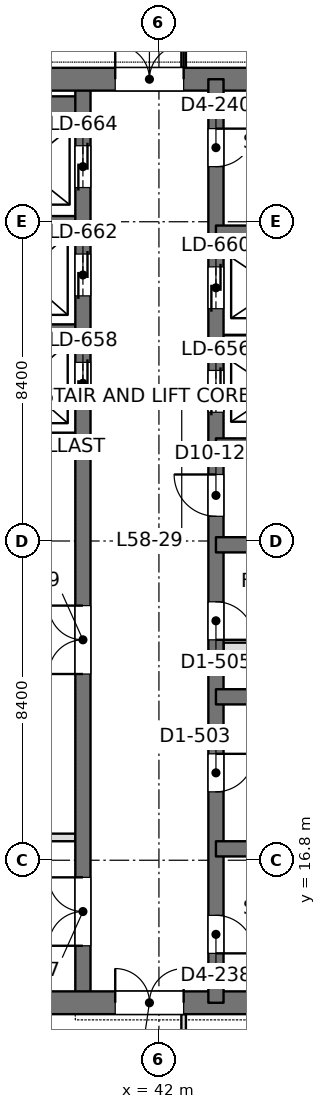
"""IFC4 building model, lengths in metres.
Left out: names, types, materials, properties, quantities, classifications, styles, units other than length and angle.
Written with IfcOpenShell. Run it as: python <this file> out.ifc"""

import sys

from ifc_helpers import new_model, si_unit, direction, frame, frame_2d, origin, place, context, subcontext, project, spatial, rectangle, extrude, element, fill, save


model = new_model("IFC4")
c1 = context("Model", 3, precision=1e-05, world=origin(), true_north=direction((0.0, 1.0)))
c2 = subcontext(c1, "Body", "Model", "MODEL_VIEW")
j1 = project(units=[si_unit("LENGTHUNIT", "METRE"), si_unit("PLANEANGLEUNIT", "RADIAN")], contexts=[c1])
p1 = place(None, origin())
s1 = spatial("IfcSite", under=j1, at=p1, CompositionType="ELEMENT")
p2 = place(p1, origin())
s2 = spatial("IfcBuilding", under=s1, at=p2, CompositionType="ELEMENT")
p3 = place(p2, frame((0.0, 0.0, 254.7)))
s3 = spatial("IfcBuildingStorey", under=s2, at=p3, CompositionType="ELEMENT", Elevation=254.7)
p4 = place(p3, frame((33.75, 13.05, 0.0), z_axis=(0.0, 0.0, 1.0), x_axis=(1.0, 0.0, 0.0)))
e1 = element("IfcWall", 1, at=p4, inside=s3, PredefinedType="SHEAR", context=c2, shape_type="SweptSolid", body=[
    extrude(rectangle(XDim=17.7, YDim=0.6, at=frame_2d((8.85, 0.0))), origin(), (0.0, 0.0, 1.0), 4.5),
])
p5 = place(p4, frame((7.1, 0.0, 0.0)))
e2 = element("IfcOpeningElement", 2, at=p5, cuts=e1, PredefinedType="OPENING", context=c2, shape_type="SweptSolid", body=[
    extrude(rectangle(XDim=1.8, YDim=2.4, at=frame_2d((0.9, 1.2))), frame((0.0, 0.31, 0.0), z_axis=(0.0, -1.0, 0.0), x_axis=(1.0, 0.0, 0.0)), (0.0, 0.0, 1.0), 0.62),
])
p6 = place(p3, frame((33.75, 37.35, 0.0), z_axis=(0.0, 0.0, 1.0), x_axis=(1.0, 0.0, 0.0)))
e3 = element("IfcWall", 3, at=p6, inside=s3, PredefinedType="SHEAR", context=c2, shape_type="SweptSolid", body=[
    extrude(rectangle(XDim=17.7, YDim=0.6, at=frame_2d((8.85, 0.0))), origin(), (0.0, 0.0, 1.0), 4.5),
])
p7 = place(p6, frame((7.1, 0.0, 0.0)))
e4 = element("IfcOpeningElement", 4, at=p7, cuts=e3, PredefinedType="OPENING", context=c2, shape_type="SweptSolid", body=[
    extrude(rectangle(XDim=1.8, YDim=2.4, at=frame_2d((0.9, 1.2))), frame((0.0, 0.31, 0.0), z_axis=(0.0, -1.0, 0.0), x_axis=(1.0, 0.0, 0.0)), (0.0, 0.0, 1.0), 0.62),
])
p8 = place(p3, frame((43.5, 13.05, 0.0), z_axis=(0.0, 0.0, 1.0), x_axis=(0.0, 1.0, 0.0)))
e5 = element("IfcWall", 5, at=p8, inside=s3, PredefinedType="SHEAR", context=c2, shape_type="SweptSolid", body=[
    extrude(rectangle(XDim=24.3, YDim=0.4, at=frame_2d((12.15, 0.0))), origin(), (0.0, 0.0, 1.0), 4.5),
])
p9 = place(p8, frame((1.3, 0.0, 0.0)))
e6 = element("IfcOpeningElement", 6, at=p9, cuts=e5, PredefinedType="OPENING", context=c2, shape_type="SweptSolid", body=[
    extrude(rectangle(XDim=1.0, YDim=2.2, at=frame_2d((0.5, 1.1))), frame((0.0, 0.21, 0.0), z_axis=(0.0, -1.0, 0.0), x_axis=(1.0, 0.0, 0.0)), (0.0, 0.0, 1.0), 0.42),
])
p10 = place(p8, frame((22.0, 0.0, 0.0)))
e7 = element("IfcOpeningElement", 7, at=p10, cuts=e5, PredefinedType="OPENING", context=c2, shape_type="SweptSolid", body=[
    extrude(rectangle(XDim=1.0, YDim=2.2, at=frame_2d((0.5, 1.1))), frame((0.0, 0.21, 0.0), z_axis=(0.0, -1.0, 0.0), x_axis=(1.0, 0.0, 0.0)), (0.0, 0.0, 1.0), 0.42),
])
p11 = place(p8, frame((5.55, 0.0, 0.0)))
e8 = element("IfcOpeningElement", 8, at=p11, cuts=e5, PredefinedType="OPENING", context=c2, shape_type="SweptSolid", body=[
    extrude(rectangle(XDim=1.0, YDim=2.2, at=frame_2d((0.5, 1.1))), frame((0.0, 0.21, 0.0), z_axis=(0.0, -1.0, 0.0), x_axis=(1.0, 0.0, 0.0)), (0.0, 0.0, 1.0), 0.42),
])
p12 = place(p8, frame((9.55, 0.0, 0.0)))
e9 = element("IfcOpeningElement", 9, at=p12, cuts=e5, PredefinedType="OPENING", context=c2, shape_type="SweptSolid", body=[
    extrude(rectangle(XDim=1.0, YDim=2.2, at=frame_2d((0.5, 1.1))), frame((0.0, 0.21, 0.0), z_axis=(0.0, -1.0, 0.0), x_axis=(1.0, 0.0, 0.0)), (0.0, 0.0, 1.0), 0.42),
])
p13 = place(p8, frame((12.8, 0.0, 0.0)))
e10 = element("IfcOpeningElement", 10, at=p13, cuts=e5, PredefinedType="OPENING", context=c2, shape_type="SweptSolid", body=[
    extrude(rectangle(XDim=1.1, YDim=2.2, at=frame_2d((0.55, 1.1))), frame((0.0, 0.21, 0.0), z_axis=(0.0, -1.0, 0.0), x_axis=(1.0, 0.0, 0.0)), (0.0, 0.0, 1.0), 0.42),
])
p14 = place(p8, frame((15.538, 0.0, 0.0)))
e11 = element("IfcOpeningElement", 11, at=p14, cuts=e5, PredefinedType="OPENING", context=c2, shape_type="SweptSolid", body=[
    extrude(rectangle(XDim=1.1, YDim=2.2, at=frame_2d((0.55, 1.1))), frame((0.0, 0.21, 0.0), z_axis=(0.0, -1.0, 0.0), x_axis=(1.0, 0.0, 0.0)), (0.0, 0.0, 1.0), 0.42),
])
p15 = place(p8, frame((18.262, 0.0, 0.0)))
e12 = element("IfcOpeningElement", 12, at=p15, cuts=e5, PredefinedType="OPENING", context=c2, shape_type="SweptSolid", body=[
    extrude(rectangle(XDim=1.1, YDim=2.2, at=frame_2d((0.55, 1.1))), frame((0.0, 0.21, 0.0), z_axis=(0.0, -1.0, 0.0), x_axis=(1.0, 0.0, 0.0)), (0.0, 0.0, 1.0), 0.42),
])
p16 = place(p3, frame((40.0, 13.05, 0.0), z_axis=(0.0, 0.0, 1.0), x_axis=(0.0, 1.0, 0.0)))
e13 = element("IfcWall", 13, at=p16, inside=s3, PredefinedType="SHEAR", context=c2, shape_type="SweptSolid", body=[
    extrude(rectangle(XDim=24.3, YDim=0.4, at=frame_2d((12.15, 0.0))), origin(), (0.0, 0.0, 1.0), 4.5),
])
p17 = place(p16, frame((15.75, 0.0, 0.0)))
e14 = element("IfcOpeningElement", 14, at=p17, cuts=e13, PredefinedType="OPENING", context=c2, shape_type="SweptSolid", body=[
    extrude(rectangle(XDim=1.1, YDim=2.2, at=frame_2d((0.55, 1.1))), frame((0.0, 0.21, 0.0), z_axis=(0.0, -1.0, 0.0), x_axis=(1.0, 0.0, 0.0)), (0.0, 0.0, 1.0), 0.42),
])
p18 = place(p16, frame((18.6, 0.0, 0.0)))
e15 = element("IfcOpeningElement", 15, at=p18, cuts=e13, PredefinedType="OPENING", context=c2, shape_type="SweptSolid", body=[
    extrude(rectangle(XDim=1.1, YDim=2.2, at=frame_2d((0.55, 1.1))), frame((0.0, 0.21, 0.0), z_axis=(0.0, -1.0, 0.0), x_axis=(1.0, 0.0, 0.0)), (0.0, 0.0, 1.0), 0.42),
])
p19 = place(p16, frame((21.45, 0.0, 0.0)))
e16 = element("IfcOpeningElement", 16, at=p19, cuts=e13, PredefinedType="OPENING", context=c2, shape_type="SweptSolid", body=[
    extrude(rectangle(XDim=1.1, YDim=2.2, at=frame_2d((0.55, 1.1))), frame((0.0, 0.21, 0.0), z_axis=(0.0, -1.0, 0.0), x_axis=(1.0, 0.0, 0.0)), (0.0, 0.0, 1.0), 0.42),
])
p20 = place(p16, frame((8.65, 0.0, 0.0)))
e17 = element("IfcOpeningElement", 17, at=p20, cuts=e13, PredefinedType="OPENING", context=c2, shape_type="SweptSolid", body=[
    extrude(rectangle(XDim=1.8, YDim=2.4, at=frame_2d((0.9, 1.2))), frame((0.0, 0.21, 0.0), z_axis=(0.0, -1.0, 0.0), x_axis=(1.0, 0.0, 0.0)), (0.0, 0.0, 1.0), 0.42),
])
p21 = place(p16, frame((1.5, 0.0, 0.0)))
e18 = element("IfcOpeningElement", 18, at=p21, cuts=e13, PredefinedType="OPENING", context=c2, shape_type="SweptSolid", body=[
    extrude(rectangle(XDim=1.8, YDim=2.4, at=frame_2d((0.9, 1.2))), frame((0.0, 0.21, 0.0), z_axis=(0.0, -1.0, 0.0), x_axis=(1.0, 0.0, 0.0)), (0.0, 0.0, 1.0), 0.42),
])
for number, where, z_axis, x_axis in (
    (19, (51.15, 17.1, 0.0), (0.0, 0.0, 1.0), (-1.0, 0.0, 0.0)),
    (20, (51.15, 21.1, 0.0), (0.0, 0.0, 1.0), (-1.0, 0.0, 0.0)),
    (21, (51.15, 25.1, 0.0), (0.0, 0.0, 1.0), (-1.0, 0.0, 0.0)),
    (22, (51.15, 27.7, 0.0), (0.0, 0.0, 1.0), (-1.0, 0.0, 0.0)),
    (23, (51.15, 33.3, 0.0), (0.0, 0.0, 1.0), (-1.0, 0.0, 0.0)),
):
    element("IfcWall", number, at=place(p3, frame(where, z_axis=z_axis, x_axis=x_axis)), inside=s3, PredefinedType="SHEAR", context=c2, shape_type="SweptSolid", body=[
        extrude(rectangle(XDim=7.65, YDim=0.4, at=frame_2d((3.825, 0.0))), origin(), (0.0, 0.0, 1.0), 4.5),
    ])
p22 = place(p3, frame((46.7, 30.5, 0.0), z_axis=(0.0, 0.0, 1.0), x_axis=(-1.0, 0.0, 0.0)))
e24 = element("IfcWall", 24, at=p22, inside=s3, PredefinedType="SHEAR", context=c2, shape_type="SweptSolid", body=[
    extrude(rectangle(XDim=3.2, YDim=0.25, at=frame_2d((1.6, 0.0))), origin(), (0.0, 0.0, 1.0), 4.5),
])
p23 = place(p3, frame((40.0, 27.925, 0.0), z_axis=(0.0, 0.0, 1.0), x_axis=(-1.0, 0.0, 0.0)))
e25 = element("IfcWall", 25, at=p23, inside=s3, PredefinedType="SHEAR", context=c2, shape_type="SweptSolid", body=[
    extrude(rectangle(XDim=5.95, YDim=0.25, at=frame_2d((2.975, 0.0))), origin(), (0.0, 0.0, 1.0), 4.5),
])
for number, where, z_axis, x_axis in (
    (26, (40.0, 30.775, 0.0), (0.0, 0.0, 1.0), (-1.0, 0.0, 0.0)),
    (27, (40.0, 33.625, 0.0), (0.0, 0.0, 1.0), (-1.0, 0.0, 0.0)),
):
    element("IfcWall", number, at=place(p3, frame(where, z_axis=z_axis, x_axis=x_axis)), inside=s3, PredefinedType="SHEAR", context=c2, shape_type="SweptSolid", body=[
        extrude(rectangle(XDim=3.2, YDim=0.25, at=frame_2d((1.6, 0.0))), origin(), (0.0, 0.0, 1.0), 4.5),
    ])
p24 = place(p3, frame((40.0, 36.625, 0.0), z_axis=(0.0, 0.0, 1.0), x_axis=(-1.0, 0.0, 0.0)))
e28 = element("IfcWall", 28, at=p24, inside=s3, PredefinedType="SHEAR", context=c2, shape_type="SweptSolid", body=[
    extrude(rectangle(XDim=3.2, YDim=0.55, at=frame_2d((1.6, 0.0))), origin(), (0.0, 0.0, 1.0), 4.5),
])
p25 = place(p3, frame((33.898, 17.4, 0.0), z_axis=(0.0, 0.0, 1.0), x_axis=(1.0, 0.0, 0.0)))
e29 = element("IfcWall", 29, at=p25, inside=s3, PredefinedType="PARTITIONING", context=c2, shape_type="SweptSolid", body=[
    extrude(rectangle(XDim=5.904, YDim=0.2, at=frame_2d((2.952, 0.0))), origin(), (0.0, 0.0, 1.0), 3.8),
])
p26 = place(p3, frame((42.65, 10.798, 0.0), z_axis=(0.0, 0.0, 1.0), x_axis=(0.0, 1.0, 0.0)))
e30 = element("IfcWall", 30, at=p26, inside=s3, PredefinedType="PARTITIONING", context=c2, shape_type="SweptSolid", body=[
    extrude(rectangle(XDim=1.954, YDim=0.12, at=frame_2d((0.977, 0.0))), origin(), (0.0, 0.0, 1.0), 4.35),
])
p27 = place(p26, frame((0.302, 0.0, 0.0)))
e31 = element("IfcOpeningElement", 31, at=p27, cuts=e30, PredefinedType="OPENING", context=c2, shape_type="SweptSolid", body=[
    extrude(rectangle(XDim=1.1, YDim=2.4, at=frame_2d((0.55, 1.2))), frame((0.0, 0.07, 0.0), z_axis=(0.0, -1.0, 0.0), x_axis=(1.0, 0.0, 0.0)), (0.0, 0.0, 1.0), 0.14),
])
p28 = place(p3, frame((42.65, 37.648, 0.0), z_axis=(0.0, 0.0, 1.0), x_axis=(0.0, 1.0, 0.0)))
e32 = element("IfcWall", 32, at=p28, inside=s3, PredefinedType="PARTITIONING", context=c2, shape_type="SweptSolid", body=[
    extrude(rectangle(XDim=1.954, YDim=0.12, at=frame_2d((0.977, 0.0))), origin(), (0.0, 0.0, 1.0), 4.35),
])
p29 = place(p28, frame((0.552, 0.0, 0.0)))
e33 = element("IfcOpeningElement", 33, at=p29, cuts=e32, PredefinedType="OPENING", context=c2, shape_type="SweptSolid", body=[
    extrude(rectangle(XDim=1.1, YDim=2.4, at=frame_2d((0.55, 1.2))), frame((0.0, 0.07, 0.0), z_axis=(0.0, -1.0, 0.0), x_axis=(1.0, 0.0, 0.0)), (0.0, 0.0, 1.0), 0.14),
])
p30 = place(p3, frame((43.7, 22.4, 0.0), z_axis=(0.0, 0.0, 1.0), x_axis=(1.0, 0.0, 0.0)))
e34 = element("IfcWall", 34, at=p30, inside=s3, PredefinedType="PARTITIONING", context=c2, shape_type="SweptSolid", body=[
    extrude(rectangle(XDim=6.75, YDim=0.25, at=frame_2d((3.375, 0.0))), origin(), (0.0, 0.0, 1.0), 4.3),
])
p31 = place(p30, frame((2.9, 0.0, 0.0)))
e35 = element("IfcOpeningElement", 35, at=p31, cuts=e34, PredefinedType="OPENING", context=c2, shape_type="SweptSolid", body=[
    extrude(rectangle(XDim=0.9, YDim=2.2, at=frame_2d((0.45, 1.1))), frame((0.0, 0.135, 0.0), z_axis=(0.0, -1.0, 0.0), x_axis=(1.0, 0.0, 0.0)), (0.0, 0.0, 1.0), 0.27),
])
p32 = place(p5, origin())
e36 = element("IfcDoor", 36, at=p32, inside=s3, OperationType="DOUBLE_DOOR_SINGLE_SWING", PredefinedType="DOOR", context=c2, shape_type="SweptSolid", body=[
    extrude(rectangle(XDim=1.8, YDim=2.4, at=frame_2d((0.9, 1.2))), frame((0.0, 0.025, 0.0), z_axis=(0.0, -1.0, 0.0), x_axis=(1.0, 0.0, 0.0)), (0.0, 0.0, 1.0), 0.05),
])
fill(e2, e36)
p33 = place(p7, origin())
e37 = element("IfcDoor", 37, at=p33, inside=s3, OperationType="DOUBLE_DOOR_SINGLE_SWING", PredefinedType="DOOR", context=c2, shape_type="SweptSolid", body=[
    extrude(rectangle(XDim=1.8, YDim=2.4, at=frame_2d((0.9, 1.2))), frame((0.0, 0.025, 0.0), z_axis=(0.0, -1.0, 0.0), x_axis=(1.0, 0.0, 0.0)), (0.0, 0.0, 1.0), 0.05),
])
fill(e4, e37)
p34 = place(p9, frame((1.0, 0.0, 0.0), z_axis=(0.0, 0.0, 1.0), x_axis=(-1.0, 0.0, 0.0)))
e38 = element("IfcDoor", 38, at=p34, inside=s3, OperationType="SINGLE_SWING_RIGHT", PredefinedType="DOOR", context=c2, shape_type="SweptSolid", body=[
    extrude(rectangle(XDim=1.0, YDim=2.2, at=frame_2d((0.5, 1.1))), frame((0.0, 0.025, 0.0), z_axis=(0.0, -1.0, 0.0), x_axis=(1.0, 0.0, 0.0)), (0.0, 0.0, 1.0), 0.05),
])
fill(e6, e38)
p35 = place(p10, frame((1.0, 0.0, 0.0), z_axis=(0.0, 0.0, 1.0), x_axis=(-1.0, 0.0, 0.0)))
e39 = element("IfcDoor", 39, at=p35, inside=s3, OperationType="SINGLE_SWING_LEFT", PredefinedType="DOOR", context=c2, shape_type="SweptSolid", body=[
    extrude(rectangle(XDim=1.0, YDim=2.2, at=frame_2d((0.5, 1.1))), frame((0.0, 0.025, 0.0), z_axis=(0.0, -1.0, 0.0), x_axis=(1.0, 0.0, 0.0)), (0.0, 0.0, 1.0), 0.05),
])
fill(e7, e39)
p36 = place(p11, frame((1.0, 0.0, 0.0), z_axis=(0.0, 0.0, 1.0), x_axis=(-1.0, 0.0, 0.0)))
e40 = element("IfcDoor", 40, at=p36, inside=s3, OperationType="SINGLE_SWING_LEFT", PredefinedType="DOOR", context=c2, shape_type="SweptSolid", body=[
    extrude(rectangle(XDim=1.0, YDim=2.2, at=frame_2d((0.5, 1.1))), frame((0.0, 0.025, 0.0), z_axis=(0.0, -1.0, 0.0), x_axis=(1.0, 0.0, 0.0)), (0.0, 0.0, 1.0), 0.05),
])
fill(e8, e40)
p37 = place(p12, frame((1.0, 0.0, 0.0), z_axis=(0.0, 0.0, 1.0), x_axis=(-1.0, 0.0, 0.0)))
e41 = element("IfcDoor", 41, at=p37, inside=s3, OperationType="SINGLE_SWING_RIGHT", PredefinedType="DOOR", context=c2, shape_type="SweptSolid", body=[
    extrude(rectangle(XDim=1.0, YDim=2.2, at=frame_2d((0.5, 1.1))), frame((0.0, 0.025, 0.0), z_axis=(0.0, -1.0, 0.0), x_axis=(1.0, 0.0, 0.0)), (0.0, 0.0, 1.0), 0.05),
])
fill(e9, e41)
p38 = place(p13, origin())
e42 = element("IfcDoor", 42, at=p38, inside=s3, OperationType="SINGLE_SWING_RIGHT", PredefinedType="DOOR", context=c2, shape_type="SweptSolid", body=[
    extrude(rectangle(XDim=1.1, YDim=2.2, at=frame_2d((0.55, 1.1))), frame((0.0, 0.025, 0.0), z_axis=(0.0, -1.0, 0.0), x_axis=(1.0, 0.0, 0.0)), (0.0, 0.0, 1.0), 0.05),
])
fill(e10, e42)
p39 = place(p17, origin())
e43 = element("IfcDoor", 43, at=p39, inside=s3, OperationType="DOUBLE_DOOR_SLIDING", PredefinedType="DOOR", context=c2, shape_type="SweptSolid", body=[
    extrude(rectangle(XDim=1.1, YDim=2.2, at=frame_2d((0.55, 1.1))), frame((0.0, 0.025, 0.0), z_axis=(0.0, -1.0, 0.0), x_axis=(1.0, 0.0, 0.0)), (0.0, 0.0, 1.0), 0.05),
])
fill(e14, e43)
p40 = place(p18, origin())
e44 = element("IfcDoor", 44, at=p40, inside=s3, OperationType="DOUBLE_DOOR_SLIDING", PredefinedType="DOOR", context=c2, shape_type="SweptSolid", body=[
    extrude(rectangle(XDim=1.1, YDim=2.2, at=frame_2d((0.55, 1.1))), frame((0.0, 0.025, 0.0), z_axis=(0.0, -1.0, 0.0), x_axis=(1.0, 0.0, 0.0)), (0.0, 0.0, 1.0), 0.05),
])
fill(e15, e44)
p41 = place(p19, origin())
e45 = element("IfcDoor", 45, at=p41, inside=s3, OperationType="DOUBLE_DOOR_SLIDING", PredefinedType="DOOR", context=c2, shape_type="SweptSolid", body=[
    extrude(rectangle(XDim=1.1, YDim=2.2, at=frame_2d((0.55, 1.1))), frame((0.0, 0.025, 0.0), z_axis=(0.0, -1.0, 0.0), x_axis=(1.0, 0.0, 0.0)), (0.0, 0.0, 1.0), 0.05),
])
fill(e16, e45)
p42 = place(p14, origin())
e46 = element("IfcDoor", 46, at=p42, inside=s3, OperationType="DOUBLE_DOOR_SLIDING", PredefinedType="DOOR", context=c2, shape_type="SweptSolid", body=[
    extrude(rectangle(XDim=1.1, YDim=2.2, at=frame_2d((0.55, 1.1))), frame((0.0, 0.025, 0.0), z_axis=(0.0, -1.0, 0.0), x_axis=(1.0, 0.0, 0.0)), (0.0, 0.0, 1.0), 0.05),
])
fill(e11, e46)
p43 = place(p15, origin())
e47 = element("IfcDoor", 47, at=p43, inside=s3, OperationType="DOUBLE_DOOR_SLIDING", PredefinedType="DOOR", context=c2, shape_type="SweptSolid", body=[
    extrude(rectangle(XDim=1.1, YDim=2.2, at=frame_2d((0.55, 1.1))), frame((0.0, 0.025, 0.0), z_axis=(0.0, -1.0, 0.0), x_axis=(1.0, 0.0, 0.0)), (0.0, 0.0, 1.0), 0.05),
])
fill(e12, e47)
p44 = place(p20, origin())
e48 = element("IfcDoor", 48, at=p44, inside=s3, OperationType="DOUBLE_DOOR_SINGLE_SWING", PredefinedType="DOOR", context=c2, shape_type="SweptSolid", body=[
    extrude(rectangle(XDim=1.8, YDim=2.4, at=frame_2d((0.9, 1.2))), frame((0.0, 0.025, 0.0), z_axis=(0.0, -1.0, 0.0), x_axis=(1.0, 0.0, 0.0)), (0.0, 0.0, 1.0), 0.05),
])
fill(e17, e48)
p45 = place(p21, origin())
e49 = element("IfcDoor", 49, at=p45, inside=s3, OperationType="DOUBLE_DOOR_SINGLE_SWING", PredefinedType="DOOR", context=c2, shape_type="SweptSolid", body=[
    extrude(rectangle(XDim=1.8, YDim=2.4, at=frame_2d((0.9, 1.2))), frame((0.0, 0.025, 0.0), z_axis=(0.0, -1.0, 0.0), x_axis=(1.0, 0.0, 0.0)), (0.0, 0.0, 1.0), 0.05),
])
fill(e18, e49)
save(model, sys.argv[1])
